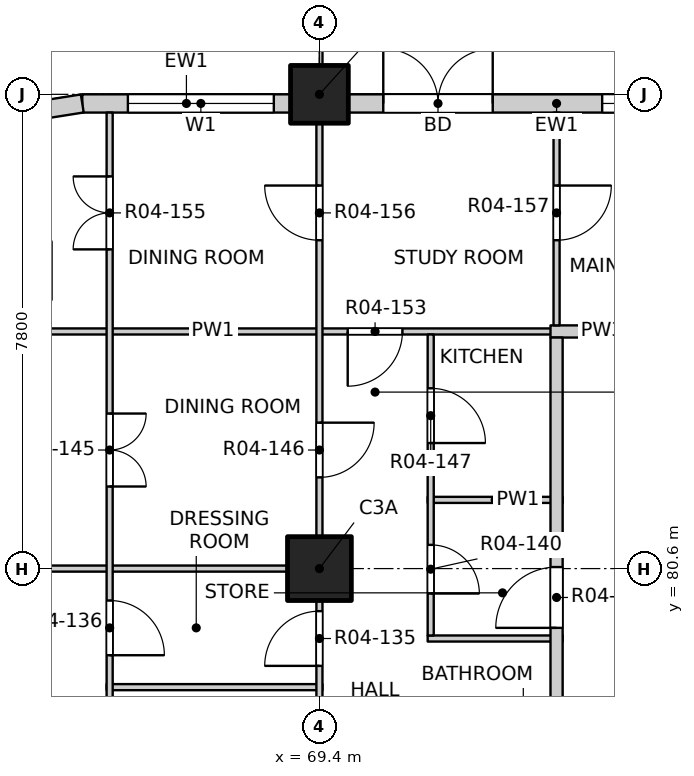
"""IFC4 building model, lengths in metres.
Left out: names, types, materials, properties, quantities, classifications, styles, units other than length and angle.
Written with IfcOpenShell. Run it as: python <this file> out.ifc"""

import sys

from ifc_helpers import new_model, si_unit, direction, frame, frame_2d, origin, origin_2d, place, context, subcontext, project, spatial, rectangle, extrude, element, fill, save


model = new_model("IFC4")
c1 = context("Model", 3, precision=1e-05, world=origin(), true_north=direction((0.0, 1.0)))
c2 = subcontext(c1, "Body", "Model", "MODEL_VIEW")
j1 = project(units=[si_unit("LENGTHUNIT", "METRE"), si_unit("PLANEANGLEUNIT", "RADIAN")], contexts=[c1])
p1 = place(None, origin())
s1 = spatial("IfcSite", under=j1, at=p1, CompositionType="ELEMENT")
p2 = place(p1, origin())
s2 = spatial("IfcBuilding", under=s1, at=p2, CompositionType="ELEMENT")
p3 = place(p2, frame((0.0, 0.0, 58.0)))
s3 = spatial("IfcBuildingStorey", under=s2, at=p3, CompositionType="ELEMENT", Elevation=58.0)
p4 = place(p3, frame((69.4, 88.4, -0.25), z_axis=(0.0, 0.0, 1.0), x_axis=(1.0, 0.0, 0.0)))
e1 = element("IfcColumn", 1, at=p4, inside=s3, PredefinedType="COLUMN", context=c2, shape_type="SweptSolid", body=[
    extrude(rectangle(XDim=0.95, YDim=0.95, at=origin_2d()), origin(), (0.0, 0.0, 1.0), 3.4),
])
p5 = place(p3, frame((69.4, 80.6, -0.25), z_axis=(0.0, 0.0, 1.0), x_axis=(1.0, 0.0, 0.0)))
e2 = element("IfcColumn", 2, at=p5, inside=s3, PredefinedType="COLUMN", context=c2, shape_type="SweptSolid", body=[
    extrude(rectangle(XDim=1.05, YDim=1.05, at=origin_2d()), origin(), (0.0, 0.0, 1.0), 3.4),
])
p6 = place(p3, frame((65.5, 88.25, 0.0), z_axis=(0.0, 0.0, 1.0), x_axis=(1.0, 0.0, 0.0)))
e3 = element("IfcWall", 3, at=p6, inside=s3, PredefinedType="SOLIDWALL", context=c2, shape_type="SweptSolid", body=[
    extrude(rectangle(XDim=3.425, YDim=0.3, at=frame_2d((1.712, 0.0))), origin(), (0.0, 0.0, 1.0), 2.7),
])
p7 = place(p6, frame((0.75, 0.0, 0.9)))
e4 = element("IfcOpeningElement", 4, at=p7, cuts=e3, PredefinedType="OPENING", context=c2, shape_type="SweptSolid", body=[
    extrude(rectangle(XDim=2.4, YDim=1.8, at=frame_2d((1.2, 0.9))), frame((0.0, 0.16, 0.0), z_axis=(0.0, -1.0, 0.0), x_axis=(1.0, 0.0, 0.0)), (0.0, 0.0, 1.0), 0.32),
])
p8 = place(p3, frame((69.875, 88.25, 0.0), z_axis=(0.0, 0.0, 1.0), x_axis=(1.0, 0.0, 0.0)))
e5 = element("IfcWall", 5, at=p8, inside=s3, PredefinedType="SOLIDWALL", context=c2, shape_type="SweptSolid", body=[
    extrude(rectangle(XDim=6.85, YDim=0.3, at=frame_2d((3.425, 0.0))), origin(), (0.0, 0.0, 1.0), 2.7),
])
p9 = place(p8, frame((0.575, 0.0, 0.0)))
e6 = element("IfcOpeningElement", 6, at=p9, cuts=e5, PredefinedType="OPENING", context=c2, shape_type="SweptSolid", body=[
    extrude(rectangle(XDim=1.8, YDim=2.4, at=frame_2d((0.9, 1.2))), frame((0.0, 0.16, 0.0), z_axis=(0.0, -1.0, 0.0), x_axis=(1.0, 0.0, 0.0)), (0.0, 0.0, 1.0), 0.32),
])
p10 = place(p8, frame((4.175, 0.0, 0.9)))
e7 = element("IfcOpeningElement", 7, at=p10, cuts=e5, PredefinedType="OPENING", context=c2, shape_type="SweptSolid", body=[
    extrude(rectangle(XDim=2.4, YDim=1.8, at=frame_2d((1.2, 0.9))), frame((0.0, 0.16, 0.0), z_axis=(0.0, -1.0, 0.0), x_axis=(1.0, 0.0, 0.0)), (0.0, 0.0, 1.0), 0.32),
])
p11 = place(p3, frame((65.5, 88.25, 0.0), z_axis=(0.0, 0.0, 1.0), x_axis=(-0.987678452879, -0.156496880861, 0.0)))
e8 = element("IfcWall", 8, at=p11, inside=s3, PredefinedType="SOLIDWALL", context=c2, shape_type="SweptSolid", body=[
    extrude(rectangle(XDim=1.173, YDim=0.3, at=frame_2d((0.586, 0.0))), origin(), (0.0, 0.0, 1.0), 2.7),
])
p12 = place(p3, frame((65.9, 78.65, 0.0), z_axis=(0.0, 0.0, 1.0), x_axis=(1.0, 0.0, 0.0)))
e9 = element("IfcWall", 9, at=p12, inside=s3, PredefinedType="PARTITIONING", context=c2, shape_type="SweptSolid", body=[
    extrude(rectangle(XDim=3.55, YDim=0.1, at=frame_2d((1.775, 0.0))), origin(), (0.0, 0.0, 1.0), 3.15),
])
p13 = place(p3, frame((71.18, 79.45, 0.0), z_axis=(0.0, 0.0, 1.0), x_axis=(1.0, 0.0, 0.0)))
e10 = element("IfcWall", 10, at=p13, inside=s3, PredefinedType="PARTITIONING", context=c2, shape_type="SweptSolid", body=[
    extrude(rectangle(XDim=2.22, YDim=0.1, at=frame_2d((1.11, 0.0))), origin(), (0.0, 0.0, 1.0), 3.15),
])
p14 = place(p3, frame((61.9, 80.6, 0.0), z_axis=(0.0, 0.0, 1.0), x_axis=(1.0, 0.0, 0.0)))
e11 = element("IfcWall", 11, at=p14, inside=s3, PredefinedType="PARTITIONING", context=c2, shape_type="SweptSolid", body=[
    extrude(rectangle(XDim=7.55, YDim=0.1, at=frame_2d((3.775, 0.0))), origin(), (0.0, 0.0, 1.0), 2.55),
])
p15 = place(p3, frame((71.18, 81.73, 0.0), z_axis=(0.0, 0.0, 1.0), x_axis=(1.0, 0.0, 0.0)))
e12 = element("IfcWall", 12, at=p15, inside=s3, PredefinedType="PARTITIONING", context=c2, shape_type="SweptSolid", body=[
    extrude(rectangle(XDim=2.22, YDim=0.1, at=frame_2d((1.11, 0.0))), origin(), (0.0, 0.0, 1.0), 3.15),
])
p16 = place(p3, frame((61.9, 84.5, 0.0), z_axis=(0.0, 0.0, 1.0), x_axis=(1.0, 0.0, 0.0)))
e13 = element("IfcWall", 13, at=p16, inside=s3, PredefinedType="PARTITIONING", context=c2, shape_type="SweptSolid", body=[
    extrude(rectangle(XDim=11.5, YDim=0.1, at=frame_2d((5.75, 0.0))), origin(), (0.0, 0.0, 1.0), 3.15),
])
p17 = place(p16, frame((7.965, 0.0, 0.0)))
e14 = element("IfcOpeningElement", 14, at=p17, cuts=e13, PredefinedType="OPENING", context=c2, shape_type="SweptSolid", body=[
    extrude(rectangle(XDim=0.9, YDim=2.1, at=frame_2d((0.45, 1.05))), frame((0.0, 0.06, 0.0), z_axis=(0.0, -1.0, 0.0), x_axis=(1.0, 0.0, 0.0)), (0.0, 0.0, 1.0), 0.12),
])
p18 = place(p3, frame((73.2, 84.5, 0.0), z_axis=(0.0, 0.0, 1.0), x_axis=(1.0, 0.0, 0.0)))
e15 = element("IfcWall", 15, at=p18, inside=s3, PredefinedType="PARTITIONING", context=c2, shape_type="SweptSolid", body=[
    extrude(rectangle(XDim=1.7, YDim=0.2, at=frame_2d((0.85, 0.0))), origin(), (0.0, 0.0, 1.0), 3.15),
])
p19 = place(p3, frame((65.95, 76.8, 0.0), z_axis=(0.0, 0.0, 1.0), x_axis=(0.0, 1.0, 0.0)))
e16 = element("IfcWall", 16, at=p19, inside=s3, PredefinedType="PARTITIONING", context=c2, shape_type="SweptSolid", body=[
    extrude(rectangle(XDim=11.3, YDim=0.1, at=frame_2d((5.65, 0.0))), origin(), (0.0, 0.0, 1.0), 3.15),
])
p20 = place(p19, frame((0.425, 0.0, 0.0)))
e17 = element("IfcOpeningElement", 17, at=p20, cuts=e16, PredefinedType="OPENING", context=c2, shape_type="SweptSolid", body=[
    extrude(rectangle(XDim=0.9, YDim=2.1, at=frame_2d((0.45, 1.05))), frame((0.0, 0.06, 0.0), z_axis=(0.0, -1.0, 0.0), x_axis=(1.0, 0.0, 0.0)), (0.0, 0.0, 1.0), 0.12),
])
p21 = place(p19, frame((2.375, 0.0, 0.0)))
e18 = element("IfcOpeningElement", 18, at=p21, cuts=e16, PredefinedType="OPENING", context=c2, shape_type="SweptSolid", body=[
    extrude(rectangle(XDim=0.9, YDim=2.1, at=frame_2d((0.45, 1.05))), frame((0.0, 0.06, 0.0), z_axis=(0.0, -1.0, 0.0), x_axis=(1.0, 0.0, 0.0)), (0.0, 0.0, 1.0), 0.12),
])
p22 = place(p19, frame((5.15, 0.0, 0.0)))
e19 = element("IfcOpeningElement", 19, at=p22, cuts=e16, PredefinedType="OPENING", context=c2, shape_type="SweptSolid", body=[
    extrude(rectangle(XDim=1.2, YDim=2.1, at=frame_2d((0.6, 1.05))), frame((0.0, 0.06, 0.0), z_axis=(0.0, -1.0, 0.0), x_axis=(1.0, 0.0, 0.0)), (0.0, 0.0, 1.0), 0.12),
])
p23 = place(p19, frame((9.05, 0.0, 0.0)))
e20 = element("IfcOpeningElement", 20, at=p23, cuts=e16, PredefinedType="OPENING", context=c2, shape_type="SweptSolid", body=[
    extrude(rectangle(XDim=1.2, YDim=2.1, at=frame_2d((0.6, 1.05))), frame((0.0, 0.06, 0.0), z_axis=(0.0, -1.0, 0.0), x_axis=(1.0, 0.0, 0.0)), (0.0, 0.0, 1.0), 0.12),
])
p24 = place(p3, frame((69.4, 49.4, 0.0), z_axis=(0.0, 0.0, 1.0), x_axis=(0.0, 1.0, 0.0)))
e21 = element("IfcWall", 21, at=p24, inside=s3, PredefinedType="PARTITIONING", context=c2, shape_type="SweptSolid", body=[
    extrude(rectangle(XDim=31.2, YDim=0.1, at=frame_2d((15.6, 0.0))), origin(), (0.0, 0.0, 1.0), 3.15),
])
p25 = place(p24, frame((2.475, 0.0, 0.0)))
e22 = element("IfcOpeningElement", 22, at=p25, cuts=e21, PredefinedType="OPENING", context=c2, shape_type="SweptSolid", body=[
    extrude(rectangle(XDim=0.9, YDim=2.1, at=frame_2d((0.45, 1.05))), frame((0.0, 0.06, 0.0), z_axis=(0.0, -1.0, 0.0), x_axis=(1.0, 0.0, 0.0)), (0.0, 0.0, 1.0), 0.12),
])
p26 = place(p24, frame((5.4, 0.0, 0.0)))
e23 = element("IfcOpeningElement", 23, at=p26, cuts=e21, PredefinedType="OPENING", context=c2, shape_type="SweptSolid", body=[
    extrude(rectangle(XDim=0.9, YDim=2.1, at=frame_2d((0.45, 1.05))), frame((0.0, 0.06, 0.0), z_axis=(0.0, -1.0, 0.0), x_axis=(1.0, 0.0, 0.0)), (0.0, 0.0, 1.0), 0.12),
])
p27 = place(p24, frame((10.275, 0.0, 0.0)))
e24 = element("IfcOpeningElement", 24, at=p27, cuts=e21, PredefinedType="OPENING", context=c2, shape_type="SweptSolid", body=[
    extrude(rectangle(XDim=0.9, YDim=2.1, at=frame_2d((0.45, 1.05))), frame((0.0, 0.06, 0.0), z_axis=(0.0, -1.0, 0.0), x_axis=(1.0, 0.0, 0.0)), (0.0, 0.0, 1.0), 0.12),
])
p28 = place(p24, frame((13.2, 0.0, 0.0)))
e25 = element("IfcOpeningElement", 25, at=p28, cuts=e21, PredefinedType="OPENING", context=c2, shape_type="SweptSolid", body=[
    extrude(rectangle(XDim=0.9, YDim=2.1, at=frame_2d((0.45, 1.05))), frame((0.0, 0.06, 0.0), z_axis=(0.0, -1.0, 0.0), x_axis=(1.0, 0.0, 0.0)), (0.0, 0.0, 1.0), 0.12),
])
p29 = place(p24, frame((18.075, 0.0, 0.0)))
e26 = element("IfcOpeningElement", 26, at=p29, cuts=e21, PredefinedType="OPENING", context=c2, shape_type="SweptSolid", body=[
    extrude(rectangle(XDim=0.9, YDim=2.1, at=frame_2d((0.45, 1.05))), frame((0.0, 0.06, 0.0), z_axis=(0.0, -1.0, 0.0), x_axis=(1.0, 0.0, 0.0)), (0.0, 0.0, 1.0), 0.12),
])
p30 = place(p24, frame((21.8, 0.0, 0.0)))
e27 = element("IfcOpeningElement", 27, at=p30, cuts=e21, PredefinedType="OPENING", context=c2, shape_type="SweptSolid", body=[
    extrude(rectangle(XDim=0.9, YDim=2.1, at=frame_2d((0.45, 1.05))), frame((0.0, 0.06, 0.0), z_axis=(0.0, -1.0, 0.0), x_axis=(1.0, 0.0, 0.0)), (0.0, 0.0, 1.0), 0.12),
])
p31 = place(p24, frame((25.875, 0.0, 0.0)))
e28 = element("IfcOpeningElement", 28, at=p31, cuts=e21, PredefinedType="OPENING", context=c2, shape_type="SweptSolid", body=[
    extrude(rectangle(XDim=0.9, YDim=2.1, at=frame_2d((0.45, 1.05))), frame((0.0, 0.06, 0.0), z_axis=(0.0, -1.0, 0.0), x_axis=(1.0, 0.0, 0.0)), (0.0, 0.0, 1.0), 0.12),
])
p32 = place(p24, frame((29.6, 0.0, 0.0)))
e29 = element("IfcOpeningElement", 29, at=p32, cuts=e21, PredefinedType="OPENING", context=c2, shape_type="SweptSolid", body=[
    extrude(rectangle(XDim=0.9, YDim=2.1, at=frame_2d((0.45, 1.05))), frame((0.0, 0.06, 0.0), z_axis=(0.0, -1.0, 0.0), x_axis=(1.0, 0.0, 0.0)), (0.0, 0.0, 1.0), 0.12),
])
p33 = place(p3, frame((69.4, 80.6, 0.0), z_axis=(0.0, 0.0, 1.0), x_axis=(0.0, 1.0, 0.0)))
e30 = element("IfcWall", 30, at=p33, inside=s3, PredefinedType="PARTITIONING", context=c2, shape_type="SweptSolid", body=[
    extrude(rectangle(XDim=7.5, YDim=0.1, at=frame_2d((3.75, 0.0))), origin(), (0.0, 0.0, 1.0), 2.55),
])
p34 = place(p33, frame((1.5, 0.0, 0.0)))
e31 = element("IfcOpeningElement", 31, at=p34, cuts=e30, PredefinedType="OPENING", context=c2, shape_type="SweptSolid", body=[
    extrude(rectangle(XDim=0.9, YDim=2.1, at=frame_2d((0.45, 1.05))), frame((0.0, 0.06, 0.0), z_axis=(0.0, -1.0, 0.0), x_axis=(1.0, 0.0, 0.0)), (0.0, 0.0, 1.0), 0.12),
])
p35 = place(p33, frame((5.4, 0.0, 0.0)))
e32 = element("IfcOpeningElement", 32, at=p35, cuts=e30, PredefinedType="OPENING", context=c2, shape_type="SweptSolid", body=[
    extrude(rectangle(XDim=0.9, YDim=2.1, at=frame_2d((0.45, 1.05))), frame((0.0, 0.06, 0.0), z_axis=(0.0, -1.0, 0.0), x_axis=(1.0, 0.0, 0.0)), (0.0, 0.0, 1.0), 0.12),
])
p36 = place(p3, frame((71.23, 79.5, 0.0), z_axis=(0.0, 0.0, 1.0), x_axis=(0.0, 1.0, 0.0)))
e33 = element("IfcWall", 33, at=p36, inside=s3, PredefinedType="PARTITIONING", context=c2, shape_type="SweptSolid", body=[
    extrude(rectangle(XDim=4.95, YDim=0.1, at=frame_2d((2.475, 0.0))), origin(), (0.0, 0.0, 1.0), 3.15),
])
p37 = place(p36, frame((0.69, 0.0, 0.0)))
e34 = element("IfcOpeningElement", 34, at=p37, cuts=e33, PredefinedType="OPENING", context=c2, shape_type="SweptSolid", body=[
    extrude(rectangle(XDim=0.8, YDim=2.1, at=frame_2d((0.4, 1.05))), frame((0.0, 0.06, 0.0), z_axis=(0.0, -1.0, 0.0), x_axis=(1.0, 0.0, 0.0)), (0.0, 0.0, 1.0), 0.12),
])
p38 = place(p36, frame((3.165, 0.0, 0.0)))
e35 = element("IfcOpeningElement", 35, at=p38, cuts=e33, PredefinedType="OPENING", context=c2, shape_type="SweptSolid", body=[
    extrude(rectangle(XDim=0.9, YDim=2.1, at=frame_2d((0.45, 1.05))), frame((0.0, 0.06, 0.0), z_axis=(0.0, -1.0, 0.0), x_axis=(1.0, 0.0, 0.0)), (0.0, 0.0, 1.0), 0.12),
])
p39 = place(p3, frame((73.3, 53.4, 0.0), z_axis=(0.0, 0.0, 1.0), x_axis=(0.0, 1.0, 0.0)))
e36 = element("IfcWall", 36, at=p39, inside=s3, PredefinedType="PARTITIONING", context=c2, shape_type="SweptSolid", body=[
    extrude(rectangle(XDim=31.0, YDim=0.2, at=frame_2d((15.5, 0.0))), origin(), (0.0, 0.0, 1.0), 3.15),
])
p40 = place(p39, frame((3.325, 0.0, 0.0)))
e37 = element("IfcOpeningElement", 37, at=p40, cuts=e36, PredefinedType="OPENING", context=c2, shape_type="SweptSolid", body=[
    extrude(rectangle(XDim=1.0, YDim=2.1, at=frame_2d((0.5, 1.05))), frame((0.0, 0.11, 0.0), z_axis=(0.0, -1.0, 0.0), x_axis=(1.0, 0.0, 0.0)), (0.0, 0.0, 1.0), 0.22),
])
p41 = place(p39, frame((21.675, 0.0, 0.0)))
e38 = element("IfcOpeningElement", 38, at=p41, cuts=e36, PredefinedType="OPENING", context=c2, shape_type="SweptSolid", body=[
    extrude(rectangle(XDim=1.0, YDim=2.1, at=frame_2d((0.5, 1.05))), frame((0.0, 0.11, 0.0), z_axis=(0.0, -1.0, 0.0), x_axis=(1.0, 0.0, 0.0)), (0.0, 0.0, 1.0), 0.22),
])
p42 = place(p39, frame((26.225, 0.0, 0.0)))
e39 = element("IfcOpeningElement", 39, at=p42, cuts=e36, PredefinedType="OPENING", context=c2, shape_type="SweptSolid", body=[
    extrude(rectangle(XDim=1.0, YDim=2.1, at=frame_2d((0.5, 1.05))), frame((0.0, 0.11, 0.0), z_axis=(0.0, -1.0, 0.0), x_axis=(1.0, 0.0, 0.0)), (0.0, 0.0, 1.0), 0.22),
])
p43 = place(p3, frame((73.3, 84.6, 0.0), z_axis=(0.0, 0.0, 1.0), x_axis=(0.0, 1.0, 0.0)))
e40 = element("IfcWall", 40, at=p43, inside=s3, PredefinedType="PARTITIONING", context=c2, shape_type="SweptSolid", body=[
    extrude(rectangle(XDim=3.5, YDim=0.1, at=frame_2d((1.75, 0.0))), origin(), (0.0, 0.0, 1.0), 3.15),
])
p44 = place(p43, frame((1.4, 0.0, 0.0)))
e41 = element("IfcOpeningElement", 41, at=p44, cuts=e40, PredefinedType="OPENING", context=c2, shape_type="SweptSolid", body=[
    extrude(rectangle(XDim=0.9, YDim=2.1, at=frame_2d((0.45, 1.05))), frame((0.0, 0.06, 0.0), z_axis=(0.0, -1.0, 0.0), x_axis=(1.0, 0.0, 0.0)), (0.0, 0.0, 1.0), 0.12),
])
p45 = place(p7, origin())
e42 = element("IfcWindow", 42, at=p45, inside=s3, PartitioningType="DOUBLE_PANEL_VERTICAL", PredefinedType="WINDOW", context=c2, shape_type="SweptSolid", body=[
    extrude(rectangle(XDim=2.4, YDim=1.8, at=frame_2d((1.2, 0.9))), frame((0.0, 0.03, 0.0), z_axis=(0.0, -1.0, 0.0), x_axis=(1.0, 0.0, 0.0)), (0.0, 0.0, 1.0), 0.06),
])
fill(e4, e42)
p46 = place(p9, origin())
e43 = element("IfcDoor", 43, at=p46, inside=s3, OperationType="DOUBLE_DOOR_SINGLE_SWING", PredefinedType="DOOR", context=c2, shape_type="SweptSolid", body=[
    extrude(rectangle(XDim=1.8, YDim=2.4, at=frame_2d((0.9, 1.2))), frame((0.0, 0.025, 0.0), z_axis=(0.0, -1.0, 0.0), x_axis=(1.0, 0.0, 0.0)), (0.0, 0.0, 1.0), 0.05),
])
fill(e6, e43)
p47 = place(p10, origin())
e44 = element("IfcWindow", 44, at=p47, inside=s3, PartitioningType="DOUBLE_PANEL_VERTICAL", PredefinedType="WINDOW", context=c2, shape_type="SweptSolid", body=[
    extrude(rectangle(XDim=2.4, YDim=1.8, at=frame_2d((1.2, 0.9))), frame((0.0, 0.03, 0.0), z_axis=(0.0, -1.0, 0.0), x_axis=(1.0, 0.0, 0.0)), (0.0, 0.0, 1.0), 0.06),
])
fill(e7, e44)
p48 = place(p32, origin())
e45 = element("IfcDoor", 45, at=p48, inside=s3, OperationType="SINGLE_SWING_LEFT", PredefinedType="DOOR", context=c2, shape_type="SweptSolid", body=[
    extrude(rectangle(XDim=0.9, YDim=2.1, at=frame_2d((0.45, 1.05))), frame((0.0, 0.025, 0.0), z_axis=(0.0, -1.0, 0.0), x_axis=(1.0, 0.0, 0.0)), (0.0, 0.0, 1.0), 0.05),
])
fill(e29, e45)
p49 = place(p21, origin())
e46 = element("IfcDoor", 46, at=p49, inside=s3, OperationType="SINGLE_SWING_RIGHT", PredefinedType="DOOR", context=c2, shape_type="SweptSolid", body=[
    extrude(rectangle(XDim=0.9, YDim=2.1, at=frame_2d((0.45, 1.05))), frame((0.0, 0.025, 0.0), z_axis=(0.0, -1.0, 0.0), x_axis=(1.0, 0.0, 0.0)), (0.0, 0.0, 1.0), 0.05),
])
fill(e18, e46)
p50 = place(p42, origin())
e47 = element("IfcDoor", 47, at=p50, inside=s3, OperationType="SINGLE_SWING_RIGHT", PredefinedType="DOOR", context=c2, shape_type="SweptSolid", body=[
    extrude(rectangle(XDim=1.0, YDim=2.1, at=frame_2d((0.5, 1.05))), frame((0.0, 0.025, 0.0), z_axis=(0.0, -1.0, 0.0), x_axis=(1.0, 0.0, 0.0)), (0.0, 0.0, 1.0), 0.05),
])
fill(e39, e47)
p51 = place(p37, origin())
e48 = element("IfcDoor", 48, at=p51, inside=s3, OperationType="SINGLE_SWING_RIGHT", PredefinedType="DOOR", context=c2, shape_type="SweptSolid", body=[
    extrude(rectangle(XDim=0.8, YDim=2.1, at=frame_2d((0.4, 1.05))), frame((0.0, 0.025, 0.0), z_axis=(0.0, -1.0, 0.0), x_axis=(1.0, 0.0, 0.0)), (0.0, 0.0, 1.0), 0.05),
])
fill(e34, e48)
p52 = place(p22, origin())
e49 = element("IfcDoor", 49, at=p52, inside=s3, OperationType="DOUBLE_DOOR_SINGLE_SWING", PredefinedType="DOOR", context=c2, shape_type="SweptSolid", body=[
    extrude(rectangle(XDim=1.2, YDim=2.1, at=frame_2d((0.6, 1.05))), frame((0.0, 0.025, 0.0), z_axis=(0.0, -1.0, 0.0), x_axis=(1.0, 0.0, 0.0)), (0.0, 0.0, 1.0), 0.05),
])
fill(e19, e49)
p53 = place(p34, origin())
e50 = element("IfcDoor", 50, at=p53, inside=s3, OperationType="SINGLE_SWING_LEFT", PredefinedType="DOOR", context=c2, shape_type="SweptSolid", body=[
    extrude(rectangle(XDim=0.9, YDim=2.1, at=frame_2d((0.45, 1.05))), frame((0.0, 0.025, 0.0), z_axis=(0.0, -1.0, 0.0), x_axis=(1.0, 0.0, 0.0)), (0.0, 0.0, 1.0), 0.05),
])
fill(e31, e50)
p54 = place(p38, origin())
e51 = element("IfcDoor", 51, at=p54, inside=s3, OperationType="SINGLE_SWING_RIGHT", PredefinedType="DOOR", context=c2, shape_type="SweptSolid", body=[
    extrude(rectangle(XDim=0.9, YDim=2.1, at=frame_2d((0.45, 1.05))), frame((0.0, 0.025, 0.0), z_axis=(0.0, -1.0, 0.0), x_axis=(1.0, 0.0, 0.0)), (0.0, 0.0, 1.0), 0.05),
])
fill(e35, e51)
p55 = place(p17, origin())
e52 = element("IfcDoor", 52, at=p55, inside=s3, OperationType="SINGLE_SWING_RIGHT", PredefinedType="DOOR", context=c2, shape_type="SweptSolid", body=[
    extrude(rectangle(XDim=0.9, YDim=2.1, at=frame_2d((0.45, 1.05))), frame((0.0, 0.025, 0.0), z_axis=(0.0, -1.0, 0.0), x_axis=(1.0, 0.0, 0.0)), (0.0, 0.0, 1.0), 0.05),
])
fill(e14, e52)
p56 = place(p23, origin())
e53 = element("IfcDoor", 53, at=p56, inside=s3, OperationType="DOUBLE_DOOR_SINGLE_SWING", PredefinedType="DOOR", context=c2, shape_type="SweptSolid", body=[
    extrude(rectangle(XDim=1.2, YDim=2.1, at=frame_2d((0.6, 1.05))), frame((0.0, 0.025, 0.0), z_axis=(0.0, -1.0, 0.0), x_axis=(1.0, 0.0, 0.0)), (0.0, 0.0, 1.0), 0.05),
])
fill(e20, e53)
p57 = place(p35, origin())
e54 = element("IfcDoor", 54, at=p57, inside=s3, OperationType="SINGLE_SWING_RIGHT", PredefinedType="DOOR", context=c2, shape_type="SweptSolid", body=[
    extrude(rectangle(XDim=0.9, YDim=2.1, at=frame_2d((0.45, 1.05))), frame((0.0, 0.025, 0.0), z_axis=(0.0, -1.0, 0.0), x_axis=(1.0, 0.0, 0.0)), (0.0, 0.0, 1.0), 0.05),
])
fill(e32, e54)
p58 = place(p44, origin())
e55 = element("IfcDoor", 55, at=p58, inside=s3, OperationType="SINGLE_SWING_LEFT", PredefinedType="DOOR", context=c2, shape_type="SweptSolid", body=[
    extrude(rectangle(XDim=0.9, YDim=2.1, at=frame_2d((0.45, 1.05))), frame((0.0, 0.025, 0.0), z_axis=(0.0, -1.0, 0.0), x_axis=(1.0, 0.0, 0.0)), (0.0, 0.0, 1.0), 0.05),
])
fill(e41, e55)
save(model, sys.argv[1])
